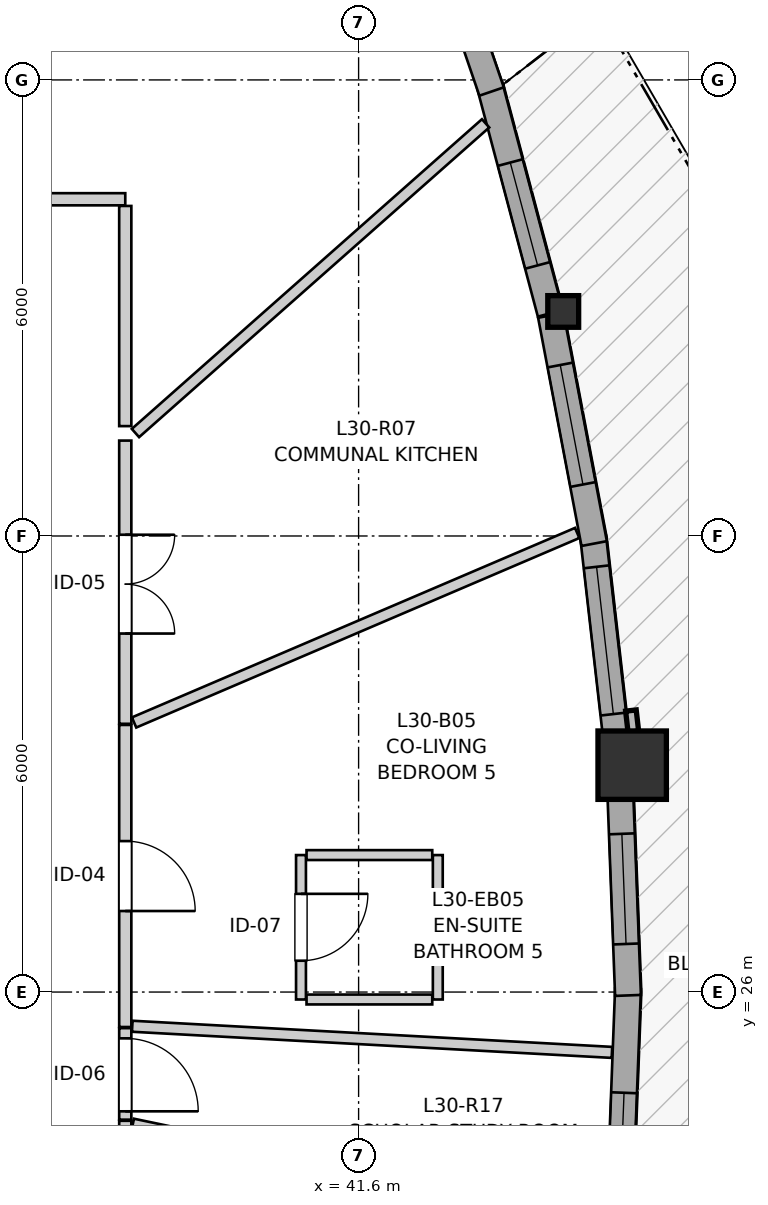
"""IFC4 building model, lengths in metres.
Left out: names, types, materials, properties, quantities, classifications, styles, units other than length and angle.
Written with IfcOpenShell. Run it as: python <this file> out.ifc"""

import sys

from ifc_helpers import new_model, si_unit, direction, frame, frame_2d, origin, origin_2d, place, context, subcontext, project, spatial, rectangle, i_section, extrude, source, transform, mapped, element, fill, save


model = new_model("IFC4")
c1 = context("Model", 3, precision=1e-05, world=origin(), true_north=direction((0.0, 1.0)))
c2 = subcontext(c1, "Body", "Model", "MODEL_VIEW")
j1 = project(units=[si_unit("LENGTHUNIT", "METRE"), si_unit("PLANEANGLEUNIT", "RADIAN")], contexts=[c1])
p1 = place(None, origin())
s1 = spatial("IfcSite", under=j1, at=p1, CompositionType="ELEMENT")
p2 = place(p1, origin())
s2 = spatial("IfcBuilding", under=s1, at=p2, CompositionType="ELEMENT")
p3 = place(p2, frame((0.0, 0.0, 102.4)))
s3 = spatial("IfcBuildingStorey", under=s2, at=p3, CompositionType="ELEMENT", Elevation=102.4)
m1 = source(origin(), c2, "Body", "SweptSolid", [
    extrude(rectangle(XDim=0.9, YDim=0.9, at=origin_2d()), origin(), (0.0, 0.0, 1.0), 2.95),
])
p4 = place(p3, frame((45.199, 28.985, 0.0), z_axis=(0.0, 0.0, 1.0), x_axis=(1.0, 0.0, 0.0)))
e1 = element("IfcColumn", 1, at=p4, inside=s3, PredefinedType="COLUMN", context=c2, shape_type="MappedRepresentation", body=[
    mapped(m1, transform((0.0, 0.0, 0.0), x_axis=(1.0, 0.0, 0.0), y_axis=(0.0, 1.0, 0.0), z_axis=(0.0, 0.0, 1.0), scale=1.0)),
])
m2 = source(origin(), c2, "Body", "SweptSolid", [
    extrude(i_section(OverallWidth=0.406, OverallDepth=0.416, WebThickness=0.027, FlangeThickness=0.044, FilletRadius=0.015, at=origin_2d()), origin(), (0.0, 0.0, 1.0), 2.95),
])
p5 = place(p3, frame((44.292, 34.954, 0.0), z_axis=(0.0, 0.0, 1.0), x_axis=(1.0, 0.0, 0.0)))
e2 = element("IfcColumn", 2, at=p5, inside=s3, PredefinedType="PILASTER", context=c2, shape_type="MappedRepresentation", body=[
    mapped(m2, transform((0.0, 0.0, 0.0), x_axis=(1.0, 0.0, 0.0), y_axis=(0.0, 1.0, 0.0), z_axis=(0.0, 0.0, 1.0), scale=1.0)),
])
p6 = place(p3, frame((45.031, 23.042, 0.0), z_axis=(0.0, 0.0, 1.0), x_axis=(0.037943223979, 0.999279896603, 0.0)))
e3 = element("IfcWall", 3, at=p6, inside=s3, PredefinedType="SOLIDWALL", context=c2, shape_type="SweptSolid", body=[
    extrude(rectangle(XDim=3.005, YDim=0.34, at=frame_2d((1.502, 0.0))), origin(), (0.0, 0.0, 1.0), 2.48),
])
p7 = place(p6, frame((0.584, 0.0, 0.82)))
e4 = element("IfcOpeningElement", 4, at=p7, cuts=e3, PredefinedType="OPENING", context=c2, shape_type="SweptSolid", body=[
    extrude(rectangle(XDim=1.05, YDim=1.45, at=frame_2d((0.525, 0.725))), frame((0.0, 0.18, 0.0), z_axis=(0.0, -1.0, 0.0), x_axis=(1.0, 0.0, 0.0)), (0.0, 0.0, 1.0), 0.36),
])
p8 = place(p3, frame((45.145, 25.956, 0.0), z_axis=(0.0, 0.0, 1.0), x_axis=(-0.038000333161, 0.9992777265, 0.0)))
e5 = element("IfcWall", 5, at=p8, inside=s3, PredefinedType="SOLIDWALL", context=c2, shape_type="SweptSolid", body=[
    extrude(rectangle(XDim=2.795, YDim=0.34, at=frame_2d((1.397, 0.0))), origin(), (0.0, 0.0, 1.0), 2.48),
])
p9 = place(p8, frame((0.677, 0.0, 0.82)))
e6 = element("IfcOpeningElement", 6, at=p9, cuts=e5, PredefinedType="OPENING", context=c2, shape_type="SweptSolid", body=[
    extrude(rectangle(XDim=1.45, YDim=1.25, at=frame_2d((0.725, 0.625))), frame((0.0, 0.18, 0.0), z_axis=(0.0, -1.0, 0.0), x_axis=(1.0, 0.0, 0.0)), (0.0, 0.0, 1.0), 0.36),
])
p10 = place(p3, frame((45.004, 29.194, 0.0), z_axis=(0.0, 0.0, 1.0), x_axis=(-0.113223342564, 0.993569562083, 0.0)))
e7 = element("IfcWall", 7, at=p10, inside=s3, PredefinedType="SOLIDWALL", context=c2, shape_type="SweptSolid", body=[
    extrude(rectangle(XDim=2.812, YDim=0.34, at=frame_2d((1.406, 0.0))), origin(), (0.0, 0.0, 1.0), 2.48),
])
p11 = place(p10, frame((0.466, 0.0, 0.82)))
e8 = element("IfcOpeningElement", 8, at=p11, cuts=e7, PredefinedType="OPENING", context=c2, shape_type="SweptSolid", body=[
    extrude(rectangle(XDim=1.95, YDim=1.4, at=frame_2d((0.975, 0.7))), frame((0.0, 0.18, 0.0), z_axis=(0.0, -1.0, 0.0), x_axis=(1.0, 0.0, 0.0)), (0.0, 0.0, 1.0), 0.36),
])
p12 = place(p3, frame((44.699, 31.9, 0.0), z_axis=(0.0, 0.0, 1.0), x_axis=(-0.186689944156, 0.982418884566, 0.0)))
e9 = element("IfcWall", 9, at=p12, inside=s3, PredefinedType="SOLIDWALL", context=c2, shape_type="SweptSolid", body=[
    extrude(rectangle(XDim=3.056, YDim=0.34, at=frame_2d((1.528, 0.0))), origin(), (0.0, 0.0, 1.0), 2.48),
])
p13 = place(p12, frame((0.791, 0.0, 0.82)))
e10 = element("IfcOpeningElement", 10, at=p13, cuts=e9, PredefinedType="OPENING", context=c2, shape_type="SweptSolid", body=[
    extrude(rectangle(XDim=1.6, YDim=1.35, at=frame_2d((0.8, 0.675))), frame((0.0, 0.18, 0.0), z_axis=(0.0, -1.0, 0.0), x_axis=(1.0, 0.0, 0.0)), (0.0, 0.0, 1.0), 0.36),
])
p14 = place(p3, frame((44.123, 34.93, 0.0), z_axis=(0.0, 0.0, 1.0), x_axis=(-0.257080487516, 0.96638999526, 0.0)))
e11 = element("IfcWall", 11, at=p14, inside=s3, PredefinedType="SOLIDWALL", context=c2, shape_type="SweptSolid", body=[
    extrude(rectangle(XDim=3.106, YDim=0.34, at=frame_2d((1.553, 0.0))), origin(), (0.0, 0.0, 1.0), 2.48),
])
p15 = place(p14, frame((0.652, 0.0, 0.82)))
e12 = element("IfcOpeningElement", 12, at=p15, cuts=e11, PredefinedType="OPENING", context=c2, shape_type="SweptSolid", body=[
    extrude(rectangle(XDim=1.4, YDim=1.35, at=frame_2d((0.7, 0.675))), frame((0.0, 0.18, 0.0), z_axis=(0.0, -1.0, 0.0), x_axis=(1.0, 0.0, 0.0)), (0.0, 0.0, 1.0), 0.36),
])
p16 = place(p3, frame((43.35, 37.848, 0.0), z_axis=(0.0, 0.0, 1.0), x_axis=(-0.323561473353, 0.946207151189, 0.0)))
e13 = element("IfcWall", 13, at=p16, inside=s3, PredefinedType="SOLIDWALL", context=c2, shape_type="SweptSolid", body=[
    extrude(rectangle(XDim=2.962, YDim=0.34, at=frame_2d((1.481, 0.0))), origin(), (0.0, 0.0, 1.0), 2.48),
])
p17 = place(p16, frame((0.861, 0.0, 0.82)))
e14 = element("IfcOpeningElement", 14, at=p17, cuts=e13, PredefinedType="OPENING", context=c2, shape_type="SweptSolid", body=[
    extrude(rectangle(XDim=1.25, YDim=1.35, at=frame_2d((0.625, 0.675))), frame((0.0, 0.18, 0.0), z_axis=(0.0, -1.0, 0.0), x_axis=(1.0, 0.0, 0.0)), (0.0, 0.0, 1.0), 0.36),
])
p18 = place(p3, frame((33.906, 36.43, 0.0), z_axis=(0.0, 0.0, 1.0), x_axis=(1.0, 0.0, 0.0)))
e15 = element("IfcWall", 15, at=p18, inside=s3, PredefinedType="PARTITIONING", context=c2, shape_type="SweptSolid", body=[
    extrude(rectangle(XDim=4.624, YDim=0.16, at=frame_2d((2.312, 0.0))), origin(), (0.0, 0.0, 1.0), 2.588),
])
p19 = place(p18, frame((1.84, 0.0, 0.0)))
e16 = element("IfcOpeningElement", 16, at=p19, cuts=e15, PredefinedType="OPENING", context=c2, shape_type="SweptSolid", body=[
    extrude(rectangle(XDim=0.96, YDim=2.1, at=frame_2d((0.48, 1.05))), frame((0.0, 0.09, 0.0), z_axis=(0.0, -1.0, 0.0), x_axis=(1.0, 0.0, 0.0)), (0.0, 0.0, 1.0), 0.18),
])
p20 = place(p3, frame((38.53, 29.514, 0.0), z_axis=(0.0, 0.0, 1.0), x_axis=(0.0, -1.0, 0.0)))
e17 = element("IfcWall", 17, at=p20, inside=s3, PredefinedType="PARTITIONING", context=c2, shape_type="SweptSolid", body=[
    extrude(rectangle(XDim=3.974, YDim=0.16, at=frame_2d((1.987, 0.0))), origin(), (0.0, 0.0, 1.0), 2.95),
])
p21 = place(p20, frame((1.528, 0.0, 0.0)))
e18 = element("IfcOpeningElement", 18, at=p21, cuts=e17, PredefinedType="OPENING", context=c2, shape_type="SweptSolid", body=[
    extrude(rectangle(XDim=0.92, YDim=2.1, at=frame_2d((0.46, 1.05))), frame((0.0, 0.09, 0.0), z_axis=(0.0, -1.0, 0.0), x_axis=(1.0, 0.0, 0.0)), (0.0, 0.0, 1.0), 0.18),
])
p22 = place(p3, frame((38.53, 33.255, 0.0), z_axis=(0.0, 0.0, 1.0), x_axis=(0.0, -1.0, 0.0)))
e19 = element("IfcWall", 19, at=p22, inside=s3, PredefinedType="PARTITIONING", context=c2, shape_type="SweptSolid", body=[
    extrude(rectangle(XDim=3.726, YDim=0.16, at=frame_2d((1.863, 0.0))), origin(), (0.0, 0.0, 1.0), 2.95),
])
p23 = place(p22, frame((1.239, 0.0, 0.0)))
e20 = element("IfcOpeningElement", 20, at=p23, cuts=e19, PredefinedType="OPENING", context=c2, shape_type="SweptSolid", body=[
    extrude(rectangle(XDim=1.3, YDim=2.1, at=frame_2d((0.65, 1.05))), frame((0.0, 0.09, 0.0), z_axis=(0.0, -1.0, 0.0), x_axis=(1.0, 0.0, 0.0)), (0.0, 0.0, 1.0), 0.18),
])
p24 = place(p3, frame((40.842, 27.802, 0.0), z_axis=(0.0, 0.0, 1.0), x_axis=(0.0, -1.0, 0.0)))
e21 = element("IfcWall", 21, at=p24, inside=s3, PredefinedType="PARTITIONING", context=c2, shape_type="SweptSolid", body=[
    extrude(rectangle(XDim=1.9, YDim=0.13, at=frame_2d((0.95, 0.0))), origin(), (0.0, 0.0, 1.0), 2.95),
])
p25 = place(p24, frame((0.51, 0.0, 0.0)))
e22 = element("IfcOpeningElement", 22, at=p25, cuts=e21, PredefinedType="OPENING", context=c2, shape_type="SweptSolid", body=[
    extrude(rectangle(XDim=0.88, YDim=2.05, at=frame_2d((0.44, 1.025))), frame((0.0, 0.075, 0.0), z_axis=(0.0, -1.0, 0.0), x_axis=(1.0, 0.0, 0.0)), (0.0, 0.0, 1.0), 0.15),
])
p26 = place(p3, frame((38.53, 24.306, 0.0), z_axis=(0.0, 0.0, 1.0), x_axis=(0.0, -1.0, 0.0)))
e23 = element("IfcWall", 23, at=p26, inside=s3, PredefinedType="PARTITIONING", context=c2, shape_type="SweptSolid", body=[
    extrude(rectangle(XDim=1.286, YDim=0.16, at=frame_2d((0.643, 0.0))), origin(), (0.0, 0.0, 1.0), 2.95),
])
p27 = place(p26, frame((0.226, 0.0, 0.0)))
e24 = element("IfcOpeningElement", 24, at=p27, cuts=e23, PredefinedType="OPENING", context=c2, shape_type="SweptSolid", body=[
    extrude(rectangle(XDim=0.86, YDim=2.05, at=frame_2d((0.43, 1.025))), frame((0.0, 0.09, 0.0), z_axis=(0.0, -1.0, 0.0), x_axis=(1.0, 0.0, 0.0)), (0.0, 0.0, 1.0), 0.18),
])
p28 = place(p3, frame((38.53, 25.525, 0.0), z_axis=(0.0, 0.0, 1.0), x_axis=(0.0, -1.0, 0.0)))
e25 = element("IfcWall", 25, at=p28, inside=s3, PredefinedType="PARTITIONING", context=c2, shape_type="SweptSolid", body=[
    extrude(rectangle(XDim=1.204, YDim=0.16, at=frame_2d((0.602, 0.0))), origin(), (0.0, 0.0, 1.0), 2.95),
])
p29 = place(p28, frame((0.134, 0.0, 0.0)))
e26 = element("IfcOpeningElement", 26, at=p29, cuts=e25, PredefinedType="OPENING", context=c2, shape_type="SweptSolid", body=[
    extrude(rectangle(XDim=0.96, YDim=2.1, at=frame_2d((0.48, 1.05))), frame((0.0, 0.09, 0.0), z_axis=(0.0, -1.0, 0.0), x_axis=(1.0, 0.0, 0.0)), (0.0, 0.0, 1.0), 0.18),
])
p30 = place(p3, frame((38.646, 29.546, 0.0), z_axis=(0.0, 0.0, 1.0), x_axis=(0.919441504603, 0.393226804293, 0.0)))
e27 = element("IfcWall", 27, at=p30, inside=s3, PredefinedType="PARTITIONING", context=c2, shape_type="SweptSolid", body=[
    extrude(rectangle(XDim=6.341, YDim=0.145, at=frame_2d((3.17, 0.0))), origin(), (0.0, 0.0, 1.0), 2.95),
])
p31 = place(p3, frame((38.631, 24.27, 0.0), z_axis=(0.0, 0.0, 1.0), x_axis=(0.978856283814, -0.204549201019, 0.0)))
e28 = element("IfcWall", 28, at=p31, inside=s3, PredefinedType="PARTITIONING", context=c2, shape_type="SweptSolid", body=[
    extrude(rectangle(XDim=6.341, YDim=0.13, at=frame_2d((3.171, 0.0))), origin(), (0.0, 0.0, 1.0), 2.95),
])
p32 = place(p3, frame((38.622, 25.55, 0.0), z_axis=(0.0, 0.0, 1.0), x_axis=(0.998518036703, -0.054421782211, 0.0)))
e29 = element("IfcWall", 29, at=p32, inside=s3, PredefinedType="PARTITIONING", context=c2, shape_type="SweptSolid", body=[
    extrude(rectangle(XDim=6.321, YDim=0.145, at=frame_2d((3.16, 0.0))), origin(), (0.0, 0.0, 1.0), 2.95),
])
p33 = place(p3, frame((38.664, 33.354, 0.0), z_axis=(0.0, 0.0, 1.0), x_axis=(0.749069296105, 0.662491652501, 0.0)))
e30 = element("IfcWall", 30, at=p33, inside=s3, PredefinedType="PARTITIONING", context=c2, shape_type="SweptSolid", body=[
    extrude(rectangle(XDim=6.15, YDim=0.145, at=frame_2d((3.075, 0.0))), origin(), (0.0, 0.0, 1.0), 2.95),
])
p34 = place(p3, frame((38.53, 33.446, 0.0), z_axis=(0.0, 0.0, 1.0), x_axis=(0.0, 1.0, 0.0)))
e31 = element("IfcWall", 31, at=p34, inside=s3, PredefinedType="PARTITIONING", context=c2, shape_type="SweptSolid", body=[
    extrude(rectangle(XDim=2.896, YDim=0.16, at=frame_2d((1.448, 0.0))), origin(), (0.0, 0.0, 1.0), 2.588),
])
p35 = place(p3, frame((42.642, 25.902, 0.0), z_axis=(0.0, 0.0, 1.0), x_axis=(0.0, 1.0, 0.0)))
e32 = element("IfcWall", 32, at=p35, inside=s3, PredefinedType="PARTITIONING", context=c2, shape_type="SweptSolid", body=[
    extrude(rectangle(XDim=1.9, YDim=0.13, at=frame_2d((0.95, 0.0))), origin(), (0.0, 0.0, 1.0), 2.558),
])
for number, where, z_axis, x_axis in (
    (33, (40.915, 27.802, 0.0), (0.0, 0.0, 1.0), (1.0, 0.0, 0.0)),
    (34, (40.915, 25.902, 0.0), (0.0, 0.0, 1.0), (1.0, 0.0, 0.0)),
):
    element("IfcWall", number, at=place(p3, frame(where, z_axis=z_axis, x_axis=x_axis)), inside=s3, PredefinedType="PARTITIONING", context=c2, shape_type="SweptSolid", body=[
        extrude(rectangle(XDim=1.654, YDim=0.13, at=frame_2d((0.827, 0.0))), origin(), (0.0, 0.0, 1.0), 2.95),
    ])
m3 = source(origin(), c2, "Body", "SweptSolid", [
    extrude(rectangle(XDim=1.05, YDim=1.45, at=frame_2d((0.525, 0.725))), frame((0.0, 0.03, 0.0), z_axis=(0.0, -1.0, 0.0), x_axis=(1.0, 0.0, 0.0)), (0.0, 0.0, 1.0), 0.06),
])
p36 = place(p7, origin())
e35 = element("IfcWindow", 35, at=p36, inside=s3, PartitioningType="SINGLE_PANEL", PredefinedType="WINDOW", context=c2, shape_type="MappedRepresentation", body=[
    mapped(m3, transform((0.0, 0.0, 0.0), x_axis=(1.0, 0.0, 0.0), y_axis=(0.0, 1.0, 0.0), z_axis=(0.0, 0.0, 1.0), scale=1.0)),
])
fill(e4, e35)
m4 = source(origin(), c2, "Body", "SweptSolid", [
    extrude(rectangle(XDim=1.45, YDim=1.25, at=frame_2d((0.725, 0.625))), frame((0.0, 0.03, 0.0), z_axis=(0.0, -1.0, 0.0), x_axis=(1.0, 0.0, 0.0)), (0.0, 0.0, 1.0), 0.06),
])
p37 = place(p9, origin())
e36 = element("IfcWindow", 36, at=p37, inside=s3, PartitioningType="SINGLE_PANEL", PredefinedType="WINDOW", context=c2, shape_type="MappedRepresentation", body=[
    mapped(m4, transform((0.0, 0.0, 0.0), x_axis=(1.0, 0.0, 0.0), y_axis=(0.0, 1.0, 0.0), z_axis=(0.0, 0.0, 1.0), scale=1.0)),
])
fill(e6, e36)
m5 = source(origin(), c2, "Body", "SweptSolid", [
    extrude(rectangle(XDim=1.95, YDim=1.4, at=frame_2d((0.975, 0.7))), frame((0.0, 0.03, 0.0), z_axis=(0.0, -1.0, 0.0), x_axis=(1.0, 0.0, 0.0)), (0.0, 0.0, 1.0), 0.06),
])
p38 = place(p11, origin())
e37 = element("IfcWindow", 37, at=p38, inside=s3, PartitioningType="SINGLE_PANEL", PredefinedType="WINDOW", context=c2, shape_type="MappedRepresentation", body=[
    mapped(m5, transform((0.0, 0.0, 0.0), x_axis=(1.0, 0.0, 0.0), y_axis=(0.0, 1.0, 0.0), z_axis=(0.0, 0.0, 1.0), scale=1.0)),
])
fill(e8, e37)
m6 = source(origin(), c2, "Body", "SweptSolid", [
    extrude(rectangle(XDim=1.6, YDim=1.35, at=frame_2d((0.8, 0.675))), frame((0.0, 0.03, 0.0), z_axis=(0.0, -1.0, 0.0), x_axis=(1.0, 0.0, 0.0)), (0.0, 0.0, 1.0), 0.06),
])
p39 = place(p13, origin())
e38 = element("IfcWindow", 38, at=p39, inside=s3, PartitioningType="SINGLE_PANEL", PredefinedType="WINDOW", context=c2, shape_type="MappedRepresentation", body=[
    mapped(m6, transform((0.0, 0.0, 0.0), x_axis=(1.0, 0.0, 0.0), y_axis=(0.0, 1.0, 0.0), z_axis=(0.0, 0.0, 1.0), scale=1.0)),
])
fill(e10, e38)
m7 = source(origin(), c2, "Body", "SweptSolid", [
    extrude(rectangle(XDim=1.4, YDim=1.35, at=frame_2d((0.7, 0.675))), frame((0.0, 0.03, 0.0), z_axis=(0.0, -1.0, 0.0), x_axis=(1.0, 0.0, 0.0)), (0.0, 0.0, 1.0), 0.06),
])
p40 = place(p15, origin())
e39 = element("IfcWindow", 39, at=p40, inside=s3, PartitioningType="SINGLE_PANEL", PredefinedType="WINDOW", context=c2, shape_type="MappedRepresentation", body=[
    mapped(m7, transform((0.0, 0.0, 0.0), x_axis=(1.0, 0.0, 0.0), y_axis=(0.0, 1.0, 0.0), z_axis=(0.0, 0.0, 1.0), scale=1.0)),
])
fill(e12, e39)
m8 = source(origin(), c2, "Body", "SweptSolid", [
    extrude(rectangle(XDim=0.92, YDim=2.1, at=frame_2d((0.46, 1.05))), frame((0.0, 0.025, 0.0), z_axis=(0.0, -1.0, 0.0), x_axis=(1.0, 0.0, 0.0)), (0.0, 0.0, 1.0), 0.05),
])
p41 = place(p21, origin())
e40 = element("IfcDoor", 40, at=p41, inside=s3, OperationType="SINGLE_SWING_RIGHT", PredefinedType="DOOR", context=c2, shape_type="MappedRepresentation", body=[
    mapped(m8, transform((0.0, 0.0, 0.0), x_axis=(1.0, 0.0, 0.0), y_axis=(0.0, 1.0, 0.0), z_axis=(0.0, 0.0, 1.0), scale=1.0)),
])
fill(e18, e40)
m9 = source(origin(), c2, "Body", "SweptSolid", [
    extrude(rectangle(XDim=1.3, YDim=2.1, at=frame_2d((0.65, 1.05))), frame((0.0, 0.025, 0.0), z_axis=(0.0, -1.0, 0.0), x_axis=(1.0, 0.0, 0.0)), (0.0, 0.0, 1.0), 0.05),
])
p42 = place(p23, origin())
e41 = element("IfcDoor", 41, at=p42, inside=s3, OperationType="DOUBLE_DOOR_SINGLE_SWING", PredefinedType="DOOR", context=c2, shape_type="MappedRepresentation", body=[
    mapped(m9, transform((0.0, 0.0, 0.0), x_axis=(1.0, 0.0, 0.0), y_axis=(0.0, 1.0, 0.0), z_axis=(0.0, 0.0, 1.0), scale=1.0)),
])
fill(e20, e41)
m10 = source(origin(), c2, "Body", "SweptSolid", [
    extrude(rectangle(XDim=0.88, YDim=2.05, at=frame_2d((0.44, 1.025))), frame((0.0, 0.025, 0.0), z_axis=(0.0, -1.0, 0.0), x_axis=(1.0, 0.0, 0.0)), (0.0, 0.0, 1.0), 0.05),
])
p43 = place(p25, origin())
e42 = element("IfcDoor", 42, at=p43, inside=s3, OperationType="SINGLE_SWING_LEFT", PredefinedType="DOOR", context=c2, shape_type="MappedRepresentation", body=[
    mapped(m10, transform((0.0, 0.0, 0.0), x_axis=(1.0, 0.0, 0.0), y_axis=(0.0, 1.0, 0.0), z_axis=(0.0, 0.0, 1.0), scale=1.0)),
])
fill(e22, e42)
m11 = source(origin(), c2, "Body", "SweptSolid", [
    extrude(rectangle(XDim=0.96, YDim=2.1, at=frame_2d((0.48, 1.05))), frame((0.0, 0.025, 0.0), z_axis=(0.0, -1.0, 0.0), x_axis=(1.0, 0.0, 0.0)), (0.0, 0.0, 1.0), 0.05),
])
p44 = place(p29, origin())
e43 = element("IfcDoor", 43, at=p44, inside=s3, OperationType="SINGLE_SWING_RIGHT", PredefinedType="DOOR", context=c2, shape_type="MappedRepresentation", body=[
    mapped(m11, transform((0.0, 0.0, 0.0), x_axis=(1.0, 0.0, 0.0), y_axis=(0.0, 1.0, 0.0), z_axis=(0.0, 0.0, 1.0), scale=1.0)),
])
fill(e26, e43)
save(model, sys.argv[1])
